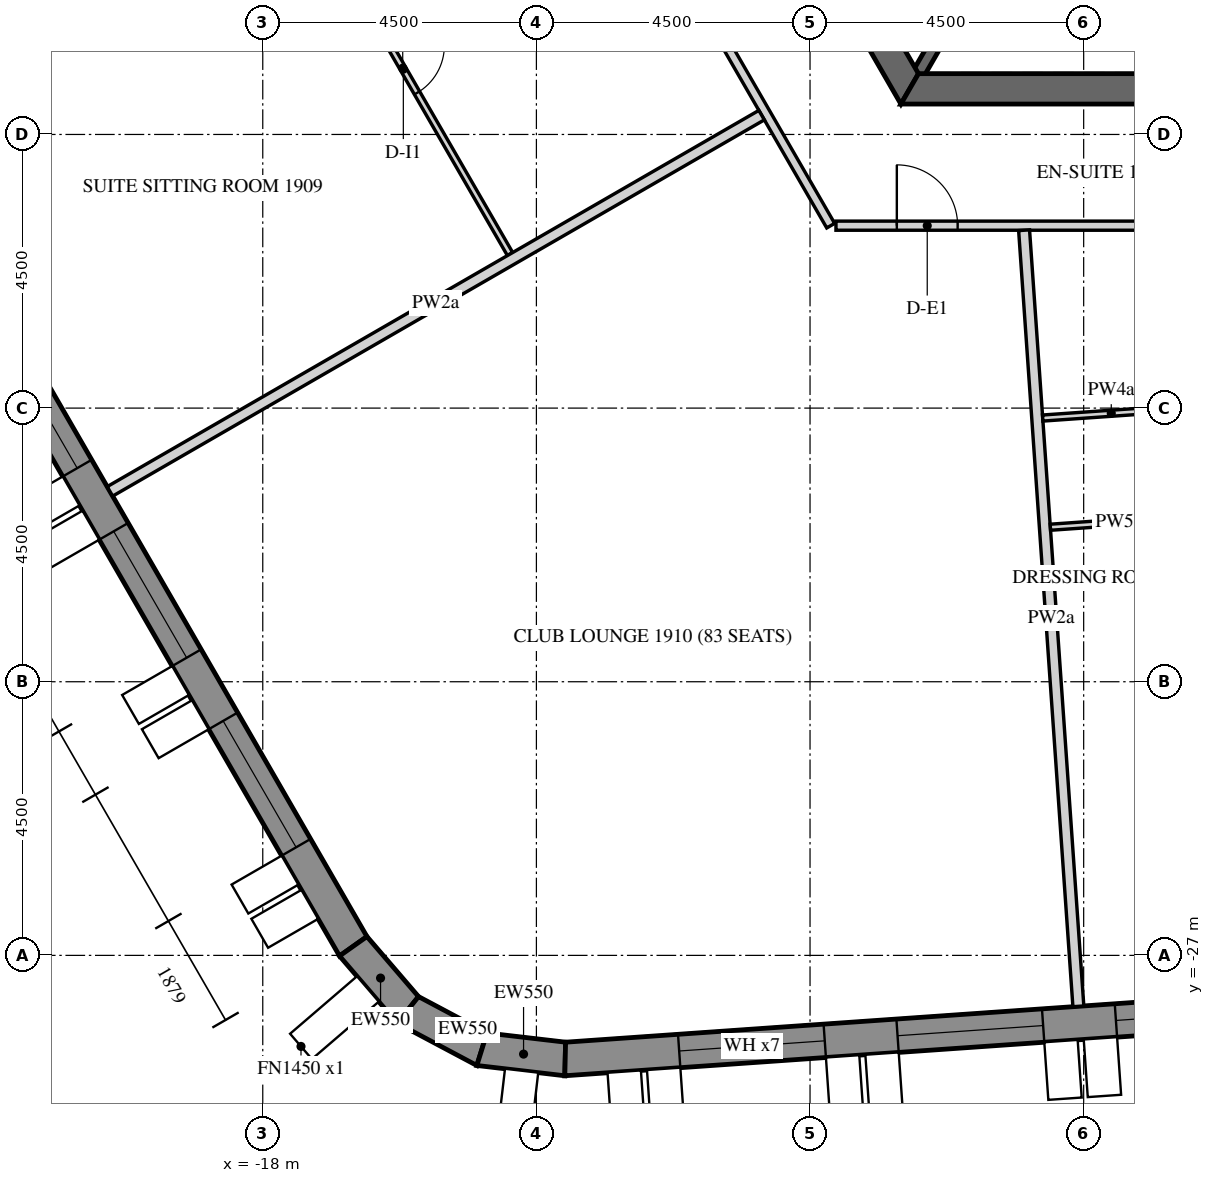
"""IFC4 building model, lengths in metres.
Left out: names, types, materials, properties, quantities, classifications, styles, units other than length and angle.
Written with IfcOpenShell. Run it as: python <this file> out.ifc"""

import sys

from ifc_helpers import new_model, si_unit, direction, frame, frame_2d, origin, place, context, subcontext, project, spatial, polyline, rectangle, outline, extrude, element, fill, save


model = new_model("IFC4")
c1 = context("Model", 3, precision=1e-05, world=origin(), true_north=direction((0.0, 1.0)))
c2 = subcontext(c1, "Body", "Model", "MODEL_VIEW")
j1 = project(units=[si_unit("LENGTHUNIT", "METRE"), si_unit("PLANEANGLEUNIT", "RADIAN")], contexts=[c1])
p1 = place(None, origin())
s1 = spatial("IfcSite", under=j1, at=p1, CompositionType="ELEMENT")
p2 = place(p1, origin())
s2 = spatial("IfcBuilding", under=s1, at=p2, CompositionType="ELEMENT")
p3 = place(p2, frame((0.0, 0.0, 238.5)))
s3 = spatial("IfcBuildingStorey", under=s2, at=p3, CompositionType="ELEMENT", Elevation=238.5)
p4 = place(p3, frame((-30.391, -2.811, -0.15), z_axis=(0.0, 0.0, 1.0), x_axis=(0.499998569178, -0.866026229868, 0.0)))
e1 = element("IfcWall", 1, at=p4, inside=s3, PredefinedType="SOLIDWALL", context=c2, shape_type="SweptSolid", body=[
    extrude(outline(polyline([(-0.022, -0.275), (27.783, -0.275), (27.732, 0.275), (0.022, 0.275), (-0.022, -0.275)])), origin(), (0.0, 0.0, 1.0), 3.9),
])
p5 = place(p4, frame((1.879, 0.0, 1.05)))
e2 = element("IfcOpeningElement", 2, at=p5, cuts=e1, PredefinedType="OPENING", context=c2, shape_type="SweptSolid", body=[
    extrude(rectangle(XDim=2.4, YDim=2.4, at=frame_2d((1.2, 1.2))), frame((0.0, 0.285, 0.0), z_axis=(0.0, -1.0, 0.0), x_axis=(1.0, 0.0, 0.0)), (0.0, 0.0, 1.0), 0.57),
])
p6 = place(p4, frame((5.479, 0.0, 1.05)))
e3 = element("IfcOpeningElement", 3, at=p6, cuts=e1, PredefinedType="OPENING", context=c2, shape_type="SweptSolid", body=[
    extrude(rectangle(XDim=2.4, YDim=2.4, at=frame_2d((1.2, 1.2))), frame((0.0, 0.285, 0.0), z_axis=(0.0, -1.0, 0.0), x_axis=(1.0, 0.0, 0.0)), (0.0, 0.0, 1.0), 0.57),
])
p7 = place(p4, frame((9.079, 0.0, 1.05)))
e4 = element("IfcOpeningElement", 4, at=p7, cuts=e1, PredefinedType="OPENING", context=c2, shape_type="SweptSolid", body=[
    extrude(rectangle(XDim=2.4, YDim=2.4, at=frame_2d((1.2, 1.2))), frame((0.0, 0.285, 0.0), z_axis=(0.0, -1.0, 0.0), x_axis=(1.0, 0.0, 0.0)), (0.0, 0.0, 1.0), 0.57),
])
p8 = place(p4, frame((12.679, 0.0, 1.05)))
e5 = element("IfcOpeningElement", 5, at=p8, cuts=e1, PredefinedType="OPENING", context=c2, shape_type="SweptSolid", body=[
    extrude(rectangle(XDim=2.4, YDim=2.4, at=frame_2d((1.2, 1.2))), frame((0.0, 0.285, 0.0), z_axis=(0.0, -1.0, 0.0), x_axis=(1.0, 0.0, 0.0)), (0.0, 0.0, 1.0), 0.57),
])
p9 = place(p4, frame((16.279, 0.0, 1.05)))
e6 = element("IfcOpeningElement", 6, at=p9, cuts=e1, PredefinedType="OPENING", context=c2, shape_type="SweptSolid", body=[
    extrude(rectangle(XDim=2.4, YDim=2.4, at=frame_2d((1.2, 1.2))), frame((0.0, 0.285, 0.0), z_axis=(0.0, -1.0, 0.0), x_axis=(1.0, 0.0, 0.0)), (0.0, 0.0, 1.0), 0.57),
])
p10 = place(p4, frame((19.879, 0.0, 1.05)))
e7 = element("IfcOpeningElement", 7, at=p10, cuts=e1, PredefinedType="OPENING", context=c2, shape_type="SweptSolid", body=[
    extrude(rectangle(XDim=2.4, YDim=2.4, at=frame_2d((1.2, 1.2))), frame((0.0, 0.285, 0.0), z_axis=(0.0, -1.0, 0.0), x_axis=(1.0, 0.0, 0.0)), (0.0, 0.0, 1.0), 0.57),
])
p11 = place(p4, frame((23.479, 0.0, 1.05)))
e8 = element("IfcOpeningElement", 8, at=p11, cuts=e1, PredefinedType="OPENING", context=c2, shape_type="SweptSolid", body=[
    extrude(rectangle(XDim=2.4, YDim=2.4, at=frame_2d((1.2, 1.2))), frame((0.0, 0.285, 0.0), z_axis=(0.0, -1.0, 0.0), x_axis=(1.0, 0.0, 0.0)), (0.0, 0.0, 1.0), 0.57),
])
p12 = place(p3, frame((-16.512, -26.85, -0.15), z_axis=(0.0, 0.0, 1.0), x_axis=(0.651621950847, -0.758543890078, 0.0)))
e9 = element("IfcWall", 9, at=p12, inside=s3, PredefinedType="SOLIDWALL", context=c2, shape_type="SweptSolid", body=[
    extrude(outline(polyline([(-0.026, -0.275), (1.431, -0.275), (1.327, 0.275), (0.026, 0.275), (-0.026, -0.275)])), origin(), (0.0, 0.0, 1.0), 3.9),
])
p13 = place(p3, frame((-15.614, -27.896, -0.15), z_axis=(0.0, 0.0, 1.0), x_axis=(0.882994189209, -0.469383917304, 0.0)))
e10 = element("IfcWall", 10, at=p13, inside=s3, PredefinedType="SOLIDWALL", context=c2, shape_type="SweptSolid", body=[
    extrude(outline(polyline([(-0.052, -0.275), (1.431, -0.275), (1.327, 0.275), (0.052, 0.275), (-0.052, -0.275)])), origin(), (0.0, 0.0, 1.0), 3.9),
])
p14 = place(p3, frame((-14.396, -28.543, -0.15), z_axis=(0.0, 0.0, 1.0), x_axis=(0.993232537394, -0.11614269956, 0.0)))
e11 = element("IfcWall", 11, at=p14, inside=s3, PredefinedType="SOLIDWALL", context=c2, shape_type="SweptSolid", body=[
    extrude(outline(polyline([(-0.052, -0.275), (1.405, -0.275), (1.353, 0.275), (0.052, 0.275), (-0.052, -0.275)])), origin(), (0.0, 0.0, 1.0), 3.9),
])
p15 = place(p3, frame((-13.026, -28.704, -0.15), z_axis=(0.0, 0.0, 1.0), x_axis=(0.99756406806, 0.069756219185, 0.0)))
e12 = element("IfcWall", 12, at=p15, inside=s3, PredefinedType="SOLIDWALL", context=c2, shape_type="SweptSolid", body=[
    extrude(outline(polyline([(-0.026, -0.275), (27.78, -0.275), (27.735, 0.275), (0.026, 0.275), (-0.026, -0.275)])), origin(), (0.0, 0.0, 1.0), 3.9),
])
p16 = place(p15, frame((1.879, 0.0, 1.05)))
e13 = element("IfcOpeningElement", 13, at=p16, cuts=e12, PredefinedType="OPENING", context=c2, shape_type="SweptSolid", body=[
    extrude(rectangle(XDim=2.4, YDim=2.4, at=frame_2d((1.2, 1.2))), frame((0.0, 0.285, 0.0), z_axis=(0.0, -1.0, 0.0), x_axis=(1.0, 0.0, 0.0)), (0.0, 0.0, 1.0), 0.57),
])
p17 = place(p15, frame((5.479, 0.0, 1.05)))
e14 = element("IfcOpeningElement", 14, at=p17, cuts=e12, PredefinedType="OPENING", context=c2, shape_type="SweptSolid", body=[
    extrude(rectangle(XDim=2.4, YDim=2.4, at=frame_2d((1.2, 1.2))), frame((0.0, 0.285, 0.0), z_axis=(0.0, -1.0, 0.0), x_axis=(1.0, 0.0, 0.0)), (0.0, 0.0, 1.0), 0.57),
])
p18 = place(p15, frame((9.079, 0.0, 1.05)))
e15 = element("IfcOpeningElement", 15, at=p18, cuts=e12, PredefinedType="OPENING", context=c2, shape_type="SweptSolid", body=[
    extrude(rectangle(XDim=2.4, YDim=2.4, at=frame_2d((1.2, 1.2))), frame((0.0, 0.285, 0.0), z_axis=(0.0, -1.0, 0.0), x_axis=(1.0, 0.0, 0.0)), (0.0, 0.0, 1.0), 0.57),
])
p19 = place(p15, frame((12.679, 0.0, 1.05)))
e16 = element("IfcOpeningElement", 16, at=p19, cuts=e12, PredefinedType="OPENING", context=c2, shape_type="SweptSolid", body=[
    extrude(rectangle(XDim=2.4, YDim=2.4, at=frame_2d((1.2, 1.2))), frame((0.0, 0.285, 0.0), z_axis=(0.0, -1.0, 0.0), x_axis=(1.0, 0.0, 0.0)), (0.0, 0.0, 1.0), 0.57),
])
p20 = place(p15, frame((16.279, 0.0, 1.05)))
e17 = element("IfcOpeningElement", 17, at=p20, cuts=e12, PredefinedType="OPENING", context=c2, shape_type="SweptSolid", body=[
    extrude(rectangle(XDim=2.4, YDim=2.4, at=frame_2d((1.2, 1.2))), frame((0.0, 0.285, 0.0), z_axis=(0.0, -1.0, 0.0), x_axis=(1.0, 0.0, 0.0)), (0.0, 0.0, 1.0), 0.57),
])
p21 = place(p15, frame((19.879, 0.0, 1.05)))
e18 = element("IfcOpeningElement", 18, at=p21, cuts=e12, PredefinedType="OPENING", context=c2, shape_type="SweptSolid", body=[
    extrude(rectangle(XDim=2.4, YDim=2.4, at=frame_2d((1.2, 1.2))), frame((0.0, 0.285, 0.0), z_axis=(0.0, -1.0, 0.0), x_axis=(1.0, 0.0, 0.0)), (0.0, 0.0, 1.0), 0.57),
])
p22 = place(p15, frame((23.479, 0.0, 1.05)))
e19 = element("IfcOpeningElement", 19, at=p22, cuts=e12, PredefinedType="OPENING", context=c2, shape_type="SweptSolid", body=[
    extrude(rectangle(XDim=2.4, YDim=2.4, at=frame_2d((1.2, 1.2))), frame((0.0, 0.285, 0.0), z_axis=(0.0, -1.0, 0.0), x_axis=(1.0, 0.0, 0.0)), (0.0, 0.0, 1.0), 0.57),
])
p23 = place(p3, frame((-14.722, 0.0, -0.15), z_axis=(0.0, 0.0, 1.0), x_axis=(0.50000571537, -0.866022103989, 0.0)))
e20 = element("IfcWall", 20, at=p23, inside=s3, PredefinedType="SHEAR", context=c2, shape_type="SweptSolid", body=[
    extrude(outline(polyline([(-0.144, -0.25), (14.867, -0.25), (14.578, 0.25), (0.144, 0.25), (-0.144, -0.25)])), origin(), (0.0, 0.0, 1.0), 3.9),
])
p24 = place(p23, frame((6.432, 0.0, 0.15)))
e21 = element("IfcOpeningElement", 21, at=p24, cuts=e20, PredefinedType="OPENING", context=c2, shape_type="SweptSolid", body=[
    extrude(rectangle(XDim=1.8, YDim=2.4, at=frame_2d((0.9, 1.2))), frame((0.0, 0.26, 0.0), z_axis=(0.0, -1.0, 0.0), x_axis=(1.0, 0.0, 0.0)), (0.0, 0.0, 1.0), 0.52),
])
p25 = place(p3, frame((-7.361, -12.75, -0.15), z_axis=(0.0, 0.0, 1.0), x_axis=(1.0, 0.0, 0.0)))
e22 = element("IfcWall", 22, at=p25, inside=s3, PredefinedType="SHEAR", context=c2, shape_type="SweptSolid", body=[
    extrude(outline(polyline([(-0.144, -0.25), (14.866, -0.25), (14.578, 0.25), (0.144, 0.25), (-0.144, -0.25)])), origin(), (0.0, 0.0, 1.0), 3.9),
])
p26 = place(p25, frame((6.761, 0.0, 0.15)))
e23 = element("IfcOpeningElement", 23, at=p26, cuts=e22, PredefinedType="OPENING", context=c2, shape_type="SweptSolid", body=[
    extrude(rectangle(XDim=1.2, YDim=2.4, at=frame_2d((0.6, 1.2))), frame((0.0, 0.26, 0.0), z_axis=(0.0, -1.0, 0.0), x_axis=(1.0, 0.0, 0.0)), (0.0, 0.0, 1.0), 0.52),
])
p27 = place(p3, frame((-5.773, -10.0, -0.15), z_axis=(0.0, 0.0, 1.0), x_axis=(-0.499995765644, -0.866027848477, 0.0)))
e24 = element("IfcWall", 24, at=p27, inside=s3, PredefinedType="SHEAR", context=c2, shape_type="SweptSolid", body=[
    extrude(rectangle(XDim=2.887, YDim=0.2, at=frame_2d((1.443, 0.0))), origin(), (0.0, 0.0, 1.0), 3.9),
])
p28 = place(p3, frame((-15.094, -3.856, 0.0), z_axis=(0.0, 0.0, 1.0), x_axis=(0.500006037985, -0.866021917724, 0.0)))
e25 = element("IfcWall", 25, at=p28, inside=s3, PredefinedType="PARTITIONING", context=c2, shape_type="SweptSolid", body=[
    extrude(rectangle(XDim=12.867, YDim=0.15, at=frame_2d((6.434, 0.0))), origin(), (0.0, 0.0, 1.0), 2.838),
])
p29 = place(p28, frame((6.125, 0.0, 0.0)))
e26 = element("IfcOpeningElement", 26, at=p29, cuts=e25, PredefinedType="OPENING", context=c2, shape_type="SweptSolid", body=[
    extrude(rectangle(XDim=1.0, YDim=2.1, at=frame_2d((0.5, 1.05))), frame((0.0, 0.085, 0.0), z_axis=(0.0, -1.0, 0.0), x_axis=(1.0, 0.0, 0.0)), (0.0, 0.0, 1.0), 0.17),
])
p30 = place(p3, frame((-8.574, -15.0, 0.0), z_axis=(0.0, 0.0, 1.0), x_axis=(1.0, 0.0, 0.0)))
e27 = element("IfcWall", 27, at=p30, inside=s3, PredefinedType="PARTITIONING", context=c2, shape_type="SweptSolid", body=[
    extrude(rectangle(XDim=13.915, YDim=0.15, at=frame_2d((6.958, 0.0))), origin(), (0.0, 0.0, 1.0), 2.838),
])
p31 = place(p30, frame((1.001, 0.0, 0.0)))
e28 = element("IfcOpeningElement", 28, at=p31, cuts=e27, PredefinedType="OPENING", context=c2, shape_type="SweptSolid", body=[
    extrude(rectangle(XDim=1.0, YDim=2.1, at=frame_2d((0.5, 1.05))), frame((0.0, 0.085, 0.0), z_axis=(0.0, -1.0, 0.0), x_axis=(1.0, 0.0, 0.0)), (0.0, 0.0, 1.0), 0.17),
])
p32 = place(p30, frame((9.199, 0.0, 0.0)))
e29 = element("IfcOpeningElement", 29, at=p32, cuts=e27, PredefinedType="OPENING", context=c2, shape_type="SweptSolid", body=[
    extrude(rectangle(XDim=1.0, YDim=2.1, at=frame_2d((0.5, 1.05))), frame((0.0, 0.085, 0.0), z_axis=(0.0, -1.0, 0.0), x_axis=(1.0, 0.0, 0.0)), (0.0, 0.0, 1.0), 0.17),
])
p33 = place(p3, frame((-24.114, -13.134, 0.0), z_axis=(0.0, 0.0, 1.0), x_axis=(0.866033062874, 0.499986733834, 0.0)))
e30 = element("IfcWall", 30, at=p33, inside=s3, PredefinedType="PARTITIONING", context=c2, shape_type="SweptSolid", body=[
    extrude(rectangle(XDim=7.65, YDim=0.1, at=frame_2d((3.825, 0.0))), origin(), (0.0, 0.0, 1.0), 2.838),
])
p34 = place(p3, frame((-17.463, -9.353, 0.0), z_axis=(0.0, 0.0, 1.0), x_axis=(0.499995846692, -0.866027801685, 0.0)))
e31 = element("IfcWall", 31, at=p34, inside=s3, PredefinedType="PARTITIONING", context=c2, shape_type="SweptSolid", body=[
    extrude(rectangle(XDim=7.06, YDim=0.1, at=frame_2d((3.53, 0.0))), origin(), (0.0, 0.0, 1.0), 2.838),
])
p35 = place(p34, frame((3.1, 0.0, 0.0)))
e32 = element("IfcOpeningElement", 32, at=p35, cuts=e31, PredefinedType="OPENING", context=c2, shape_type="SweptSolid", body=[
    extrude(rectangle(XDim=0.9, YDim=2.1, at=frame_2d((0.45, 1.05))), frame((0.0, 0.06, 0.0), z_axis=(0.0, -1.0, 0.0), x_axis=(1.0, 0.0, 0.0)), (0.0, 0.0, 1.0), 0.12),
])
p36 = place(p3, frame((-20.513, -19.37, 0.0), z_axis=(0.0, 0.0, 1.0), x_axis=(0.866024931941, 0.500000817256, 0.0)))
e33 = element("IfcWall", 33, at=p36, inside=s3, PredefinedType="PARTITIONING", context=c2, shape_type="SweptSolid", body=[
    extrude(rectangle(XDim=12.375, YDim=0.18, at=frame_2d((6.188, 0.0))), origin(), (0.0, 0.0, 1.0), 2.838),
])
p37 = place(p3, frame((-4.587, -27.838, 0.0), z_axis=(0.0, 0.0, 1.0), x_axis=(-0.069764754112, 0.997563471206, 0.0)))
e34 = element("IfcWall", 34, at=p37, inside=s3, PredefinedType="PARTITIONING", context=c2, shape_type="SweptSolid", body=[
    extrude(rectangle(XDim=12.794, YDim=0.18, at=frame_2d((6.397, 0.0))), origin(), (0.0, 0.0, 1.0), 2.838),
])
for number, where, z_axis, x_axis in (
    (35, (-2.793, -19.802, 0.0), (0.0, 0.0, 1.0), (-0.998, -0.07, 0.0)),
    (36, (-5.174, -18.164, 0.0), (0.0, 0.0, 1.0), (0.998, 0.07, 0.0)),
):
    element("IfcWall", number, at=place(p3, frame(where, z_axis=z_axis, x_axis=x_axis)), inside=s3, PredefinedType="PARTITIONING", context=c2, shape_type="SweptSolid", body=[
        extrude(rectangle(XDim=2.26, YDim=0.1, at=frame_2d((1.13, 0.0))), origin(), (0.0, 0.0, 1.0), 2.838),
    ])
p38 = place(p9, frame((0.0, 0.205, 0.0)))
e37 = element("IfcWindow", 37, at=p38, inside=s3, PartitioningType="DOUBLE_PANEL_VERTICAL", PredefinedType="WINDOW", context=c2, shape_type="SweptSolid", body=[
    extrude(rectangle(XDim=2.4, YDim=2.4, at=frame_2d((1.2, 1.2))), frame((0.0, 0.03, 0.0), z_axis=(0.0, -1.0, 0.0), x_axis=(1.0, 0.0, 0.0)), (0.0, 0.0, 1.0), 0.06),
])
fill(e6, e37)
p39 = place(p10, frame((0.0, 0.205, 0.0)))
e38 = element("IfcWindow", 38, at=p39, inside=s3, PartitioningType="DOUBLE_PANEL_VERTICAL", PredefinedType="WINDOW", context=c2, shape_type="SweptSolid", body=[
    extrude(rectangle(XDim=2.4, YDim=2.4, at=frame_2d((1.2, 1.2))), frame((0.0, 0.03, 0.0), z_axis=(0.0, -1.0, 0.0), x_axis=(1.0, 0.0, 0.0)), (0.0, 0.0, 1.0), 0.06),
])
fill(e7, e38)
p40 = place(p11, frame((0.0, 0.205, 0.0)))
e39 = element("IfcWindow", 39, at=p40, inside=s3, PartitioningType="DOUBLE_PANEL_VERTICAL", PredefinedType="WINDOW", context=c2, shape_type="SweptSolid", body=[
    extrude(rectangle(XDim=2.4, YDim=2.4, at=frame_2d((1.2, 1.2))), frame((0.0, 0.03, 0.0), z_axis=(0.0, -1.0, 0.0), x_axis=(1.0, 0.0, 0.0)), (0.0, 0.0, 1.0), 0.06),
])
fill(e8, e39)
p41 = place(p16, frame((0.0, 0.205, 0.0)))
e40 = element("IfcWindow", 40, at=p41, inside=s3, PartitioningType="DOUBLE_PANEL_VERTICAL", PredefinedType="WINDOW", context=c2, shape_type="SweptSolid", body=[
    extrude(rectangle(XDim=2.4, YDim=2.4, at=frame_2d((1.2, 1.2))), frame((0.0, 0.03, 0.0), z_axis=(0.0, -1.0, 0.0), x_axis=(1.0, 0.0, 0.0)), (0.0, 0.0, 1.0), 0.06),
])
fill(e13, e40)
p42 = place(p17, frame((0.0, 0.205, 0.0)))
e41 = element("IfcWindow", 41, at=p42, inside=s3, PartitioningType="DOUBLE_PANEL_VERTICAL", PredefinedType="WINDOW", context=c2, shape_type="SweptSolid", body=[
    extrude(rectangle(XDim=2.4, YDim=2.4, at=frame_2d((1.2, 1.2))), frame((0.0, 0.03, 0.0), z_axis=(0.0, -1.0, 0.0), x_axis=(1.0, 0.0, 0.0)), (0.0, 0.0, 1.0), 0.06),
])
fill(e14, e41)
p43 = place(p18, frame((0.0, 0.205, 0.0)))
e42 = element("IfcWindow", 42, at=p43, inside=s3, PartitioningType="DOUBLE_PANEL_VERTICAL", PredefinedType="WINDOW", context=c2, shape_type="SweptSolid", body=[
    extrude(rectangle(XDim=2.4, YDim=2.4, at=frame_2d((1.2, 1.2))), frame((0.0, 0.03, 0.0), z_axis=(0.0, -1.0, 0.0), x_axis=(1.0, 0.0, 0.0)), (0.0, 0.0, 1.0), 0.06),
])
fill(e15, e42)
p44 = place(p35, origin())
e43 = element("IfcDoor", 43, at=p44, inside=s3, OperationType="SINGLE_SWING_RIGHT", PredefinedType="DOOR", context=c2, shape_type="SweptSolid", body=[
    extrude(rectangle(XDim=0.9, YDim=2.1, at=frame_2d((0.45, 1.05))), frame((0.0, 0.025, 0.0), z_axis=(0.0, -1.0, 0.0), x_axis=(1.0, 0.0, 0.0)), (0.0, 0.0, 1.0), 0.05),
])
fill(e32, e43)
p45 = place(p31, origin())
e44 = element("IfcDoor", 44, at=p45, inside=s3, OperationType="SINGLE_SWING_RIGHT", PredefinedType="DOOR", context=c2, shape_type="SweptSolid", body=[
    extrude(rectangle(XDim=1.0, YDim=2.1, at=frame_2d((0.5, 1.05))), frame((0.0, 0.025, 0.0), z_axis=(0.0, -1.0, 0.0), x_axis=(1.0, 0.0, 0.0)), (0.0, 0.0, 1.0), 0.05),
])
fill(e28, e44)
save(model, sys.argv[1])
